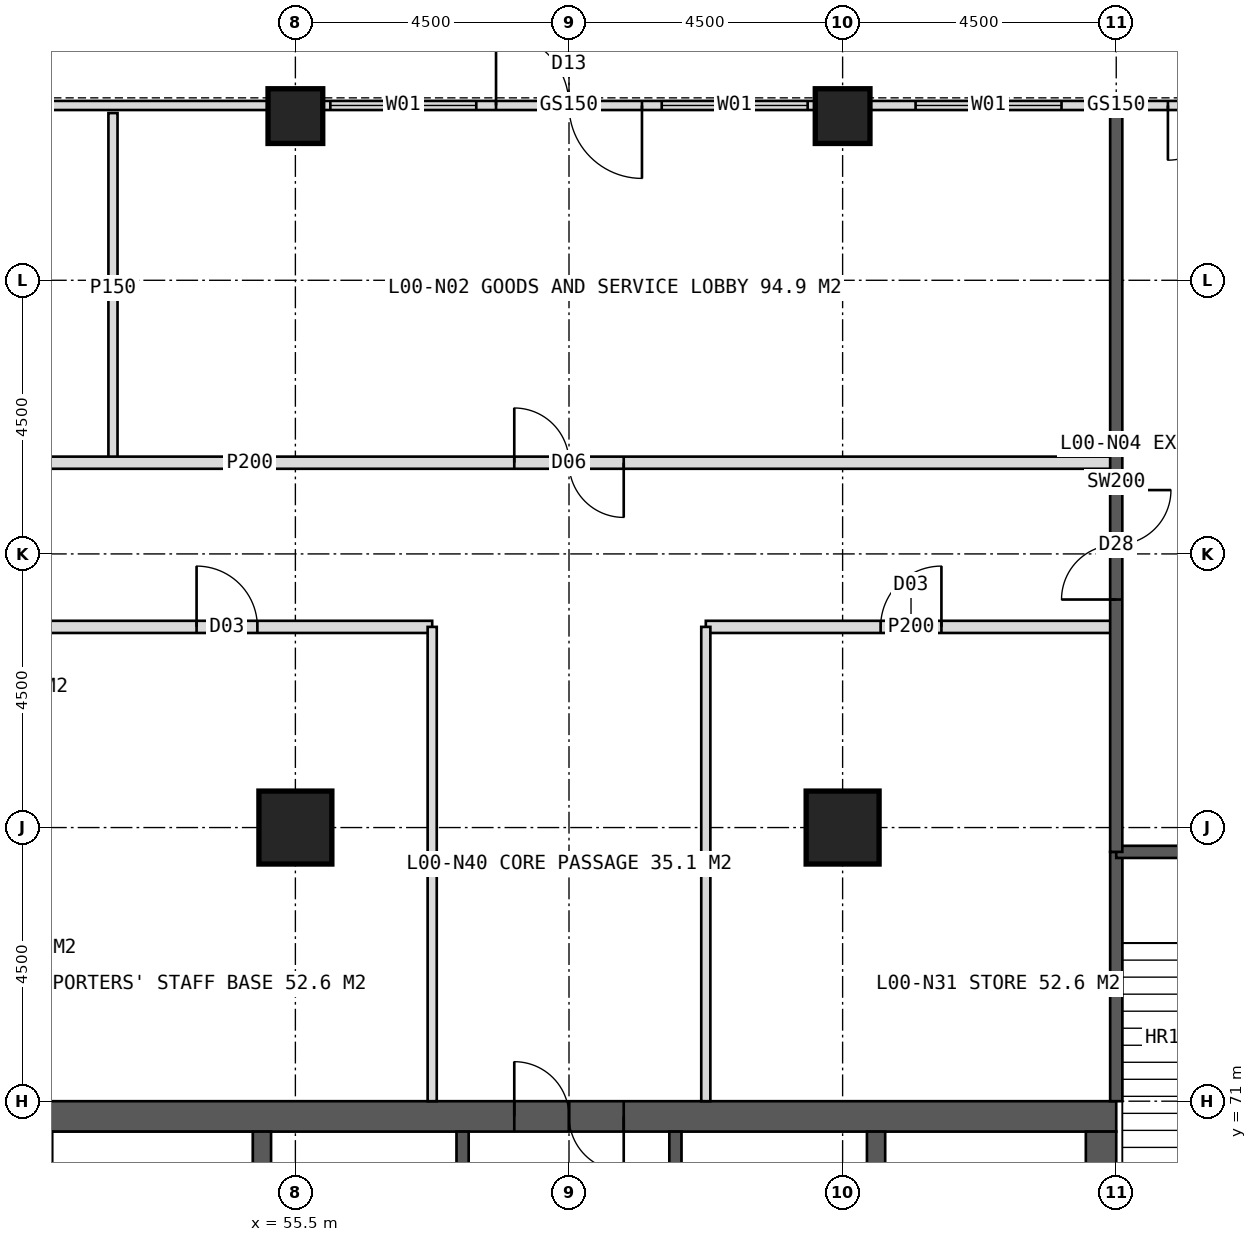
"""IFC4 building model, lengths in metres.
Left out: names, types, materials, properties, quantities, classifications, styles, units other than length and angle.
Written with IfcOpenShell. Run it as: python <this file> out.ifc"""

import sys

from ifc_helpers import new_model, si_unit, direction, frame, frame_2d, origin, origin_2d, place, context, subcontext, project, spatial, rectangle, hollow_rectangle, extrude, element, fill, save


model = new_model("IFC4")
c1 = context("Model", 3, precision=1e-05, world=origin(), true_north=direction((0.0, 1.0)))
c2 = subcontext(c1, "Body", "Model", "MODEL_VIEW")
j1 = project(units=[si_unit("LENGTHUNIT", "METRE"), si_unit("PLANEANGLEUNIT", "RADIAN")], contexts=[c1])
p1 = place(None, origin())
s1 = spatial("IfcSite", under=j1, at=p1, CompositionType="ELEMENT")
p2 = place(p1, origin())
s2 = spatial("IfcBuilding", under=s1, at=p2, CompositionType="ELEMENT")
p3 = place(p2, origin())
s3 = spatial("IfcBuildingStorey", under=s2, at=p3, CompositionType="ELEMENT", Elevation=0.0)
p4 = place(p3, frame((51.0, 70.75, 0.0), z_axis=(0.0, 0.0, 1.0), x_axis=(1.0, 0.0, 0.0)))
e1 = element("IfcWall", 1, at=p4, inside=s3, PredefinedType="SHEAR", context=c2, shape_type="SweptSolid", body=[
    extrude(rectangle(XDim=18.0, YDim=0.5, at=frame_2d((9.0, 0.0))), origin(), (0.0, 0.0, 1.0), 6.0),
])
p5 = place(p4, frame((8.1, 0.0, 0.0)))
e2 = element("IfcOpeningElement", 2, at=p5, cuts=e1, PredefinedType="OPENING", context=c2, shape_type="SweptSolid", body=[
    extrude(rectangle(XDim=1.8, YDim=2.2, at=frame_2d((0.9, 1.1))), frame((0.0, 0.26, 0.0), z_axis=(0.0, -1.0, 0.0), x_axis=(1.0, 0.0, 0.0)), (0.0, 0.0, 1.0), 0.52),
])
p6 = place(p3, frame((68.75, 53.5, 0.0), z_axis=(0.0, 0.0, 1.0), x_axis=(0.0, 1.0, 0.0)))
e3 = element("IfcWall", 3, at=p6, inside=s3, PredefinedType="SHEAR", context=c2, shape_type="SweptSolid", body=[
    extrude(rectangle(XDim=17.0, YDim=0.5, at=frame_2d((8.5, 0.0))), origin(), (0.0, 0.0, 1.0), 6.0),
])
p7 = place(p6, frame((9.5, 0.0, 0.0)))
e4 = element("IfcOpeningElement", 4, at=p7, cuts=e3, PredefinedType="OPENING", context=c2, shape_type="SweptSolid", body=[
    extrude(rectangle(XDim=1.5, YDim=2.2, at=frame_2d((0.75, 1.1))), frame((0.0, 0.26, 0.0), z_axis=(0.0, -1.0, 0.0), x_axis=(1.0, 0.0, 0.0)), (0.0, 0.0, 1.0), 0.52),
])
for number, where, z_axis, x_axis in (
    (5, (54.95, 53.5, 0.0), (0.0, 0.0, 1.0), (0.0, 1.0, 0.0)),
    (6, (65.05, 53.5, 0.0), (0.0, 0.0, 1.0), (0.0, 1.0, 0.0)),
):
    element("IfcWall", number, at=place(p3, frame(where, z_axis=z_axis, x_axis=x_axis)), inside=s3, PredefinedType="SHEAR", context=c2, shape_type="SweptSolid", body=[
        extrude(rectangle(XDim=17.0, YDim=0.3, at=frame_2d((8.5, 0.0))), origin(), (0.0, 0.0, 1.0), 6.0),
    ])
p8 = place(p3, frame((58.25, 53.5, 0.0), z_axis=(0.0, 0.0, 1.0), x_axis=(0.0, 1.0, 0.0)))
e7 = element("IfcWall", 7, at=p8, inside=s3, PredefinedType="SHEAR", context=c2, shape_type="SweptSolid", body=[
    extrude(rectangle(XDim=17.0, YDim=0.2, at=frame_2d((8.5, 0.0))), origin(), (0.0, 0.0, 1.0), 6.0),
])
p9 = place(p8, frame((1.375, 0.0, 0.0)))
e8 = element("IfcOpeningElement", 8, at=p9, cuts=e7, PredefinedType="OPENING", context=c2, shape_type="SweptSolid", body=[
    extrude(rectangle(XDim=1.4, YDim=2.2, at=frame_2d((0.7, 1.1))), frame((0.0, 0.11, 0.0), z_axis=(0.0, -1.0, 0.0), x_axis=(1.0, 0.0, 0.0)), (0.0, 0.0, 1.0), 0.22),
])
p10 = place(p8, frame((5.675, 0.0, 0.0)))
e9 = element("IfcOpeningElement", 9, at=p10, cuts=e7, PredefinedType="OPENING", context=c2, shape_type="SweptSolid", body=[
    extrude(rectangle(XDim=1.4, YDim=2.2, at=frame_2d((0.7, 1.1))), frame((0.0, 0.11, 0.0), z_axis=(0.0, -1.0, 0.0), x_axis=(1.0, 0.0, 0.0)), (0.0, 0.0, 1.0), 0.22),
])
p11 = place(p8, frame((9.925, 0.0, 0.0)))
e10 = element("IfcOpeningElement", 10, at=p11, cuts=e7, PredefinedType="OPENING", context=c2, shape_type="SweptSolid", body=[
    extrude(rectangle(XDim=1.4, YDim=2.2, at=frame_2d((0.7, 1.1))), frame((0.0, 0.11, 0.0), z_axis=(0.0, -1.0, 0.0), x_axis=(1.0, 0.0, 0.0)), (0.0, 0.0, 1.0), 0.22),
])
p12 = place(p8, frame((14.225, 0.0, 0.0)))
e11 = element("IfcOpeningElement", 11, at=p12, cuts=e7, PredefinedType="OPENING", context=c2, shape_type="SweptSolid", body=[
    extrude(rectangle(XDim=1.4, YDim=2.2, at=frame_2d((0.7, 1.1))), frame((0.0, 0.11, 0.0), z_axis=(0.0, -1.0, 0.0), x_axis=(1.0, 0.0, 0.0)), (0.0, 0.0, 1.0), 0.22),
])
p13 = place(p3, frame((61.75, 53.5, 0.0), z_axis=(0.0, 0.0, 1.0), x_axis=(0.0, 1.0, 0.0)))
e12 = element("IfcWall", 12, at=p13, inside=s3, PredefinedType="SHEAR", context=c2, shape_type="SweptSolid", body=[
    extrude(rectangle(XDim=17.0, YDim=0.2, at=frame_2d((8.5, 0.0))), origin(), (0.0, 0.0, 1.0), 6.0),
])
p14 = place(p13, frame((1.375, 0.0, 0.0)))
e13 = element("IfcOpeningElement", 13, at=p14, cuts=e12, PredefinedType="OPENING", context=c2, shape_type="SweptSolid", body=[
    extrude(rectangle(XDim=1.4, YDim=2.2, at=frame_2d((0.7, 1.1))), frame((0.0, 0.11, 0.0), z_axis=(0.0, -1.0, 0.0), x_axis=(1.0, 0.0, 0.0)), (0.0, 0.0, 1.0), 0.22),
])
p15 = place(p13, frame((5.675, 0.0, 0.0)))
e14 = element("IfcOpeningElement", 14, at=p15, cuts=e12, PredefinedType="OPENING", context=c2, shape_type="SweptSolid", body=[
    extrude(rectangle(XDim=1.4, YDim=2.2, at=frame_2d((0.7, 1.1))), frame((0.0, 0.11, 0.0), z_axis=(0.0, -1.0, 0.0), x_axis=(1.0, 0.0, 0.0)), (0.0, 0.0, 1.0), 0.22),
])
p16 = place(p13, frame((9.925, 0.0, 0.0)))
e15 = element("IfcOpeningElement", 15, at=p16, cuts=e12, PredefinedType="OPENING", context=c2, shape_type="SweptSolid", body=[
    extrude(rectangle(XDim=1.4, YDim=2.2, at=frame_2d((0.7, 1.1))), frame((0.0, 0.11, 0.0), z_axis=(0.0, -1.0, 0.0), x_axis=(1.0, 0.0, 0.0)), (0.0, 0.0, 1.0), 0.22),
])
p17 = place(p13, frame((14.225, 0.0, 0.0)))
e16 = element("IfcOpeningElement", 16, at=p17, cuts=e12, PredefinedType="OPENING", context=c2, shape_type="SweptSolid", body=[
    extrude(rectangle(XDim=1.4, YDim=2.2, at=frame_2d((0.7, 1.1))), frame((0.0, 0.11, 0.0), z_axis=(0.0, -1.0, 0.0), x_axis=(1.0, 0.0, 0.0)), (0.0, 0.0, 1.0), 0.22),
])
for number, where, z_axis, x_axis in (
    (17, (55.5, 75.5, 0.0), (0.0, 0.0, 1.0), (1.0, 0.0, 0.0)),
    (18, (64.5, 75.5, 0.0), (0.0, 0.0, 1.0), (1.0, 0.0, 0.0)),
):
    element("IfcColumn", number, at=place(p3, frame(where, z_axis=z_axis, x_axis=x_axis)), inside=s3, PredefinedType="COLUMN", context=c2, shape_type="SweptSolid", body=[
        extrude(hollow_rectangle(XDim=1.2, YDim=1.2, WallThickness=0.1, at=origin_2d()), origin(), (0.0, 0.0, 1.0), 6.0),
    ])
for number, where, z_axis, x_axis in (
    (19, (55.5, 87.2, 0.0), (0.0, 0.0, 1.0), (1.0, 0.0, 0.0)),
    (20, (64.5, 87.2, 0.0), (0.0, 0.0, 1.0), (1.0, 0.0, 0.0)),
):
    element("IfcColumn", number, at=place(p3, frame(where, z_axis=z_axis, x_axis=x_axis)), inside=s3, PredefinedType="COLUMN", context=c2, shape_type="SweptSolid", body=[
        extrude(hollow_rectangle(XDim=0.9, YDim=0.9, WallThickness=0.08, at=origin_2d()), origin(), (0.0, 0.0, 1.0), 6.0),
    ])
p18 = place(p3, frame((73.05, 87.375, 0.0), z_axis=(0.0, 0.0, 1.0), x_axis=(-1.0, 0.0, 0.0)))
e21 = element("IfcWall", 21, at=p18, inside=s3, PredefinedType="STANDARD", context=c2, shape_type="SweptSolid", body=[
    extrude(rectangle(XDim=8.1, YDim=0.15, at=frame_2d((4.05, 0.0))), origin(), (0.0, 0.0, 1.0), 5.1),
])
p19 = place(p18, frame((1.4, 0.0, 0.0)))
e22 = element("IfcOpeningElement", 22, at=p19, cuts=e21, PredefinedType="OPENING", context=c2, shape_type="SweptSolid", body=[
    extrude(rectangle(XDim=1.8, YDim=2.4, at=frame_2d((0.9, 1.2))), frame((0.0, 0.085, 0.0), z_axis=(0.0, -1.0, 0.0), x_axis=(1.0, 0.0, 0.0)), (0.0, 0.0, 1.0), 0.17),
])
p20 = place(p18, frame((4.95, 0.0, 0.6)))
e23 = element("IfcOpeningElement", 23, at=p20, cuts=e21, PredefinedType="OPENING", context=c2, shape_type="SweptSolid", body=[
    extrude(rectangle(XDim=2.4, YDim=3.0, at=frame_2d((1.2, 1.5))), frame((0.0, 0.085, 0.0), z_axis=(0.0, -1.0, 0.0), x_axis=(1.0, 0.0, 0.0)), (0.0, 0.0, 1.0), 0.17),
])
p21 = place(p3, frame((64.05, 87.375, 0.0), z_axis=(0.0, 0.0, 1.0), x_axis=(-1.0, 0.0, 0.0)))
e24 = element("IfcWall", 24, at=p21, inside=s3, PredefinedType="STANDARD", context=c2, shape_type="SweptSolid", body=[
    extrude(rectangle(XDim=8.1, YDim=0.15, at=frame_2d((4.05, 0.0))), origin(), (0.0, 0.0, 1.0), 5.1),
])
p22 = place(p21, frame((2.85, 0.0, 0.0)))
e25 = element("IfcOpeningElement", 25, at=p22, cuts=e24, PredefinedType="OPENING", context=c2, shape_type="SweptSolid", body=[
    extrude(rectangle(XDim=2.4, YDim=2.7, at=frame_2d((1.2, 1.35))), frame((0.0, 0.085, 0.0), z_axis=(0.0, -1.0, 0.0), x_axis=(1.0, 0.0, 0.0)), (0.0, 0.0, 1.0), 0.17),
])
p23 = place(p21, frame((0.125, 0.0, 0.6)))
e26 = element("IfcOpeningElement", 26, at=p23, cuts=e24, PredefinedType="OPENING", context=c2, shape_type="SweptSolid", body=[
    extrude(rectangle(XDim=2.4, YDim=3.0, at=frame_2d((1.2, 1.5))), frame((0.0, 0.085, 0.0), z_axis=(0.0, -1.0, 0.0), x_axis=(1.0, 0.0, 0.0)), (0.0, 0.0, 1.0), 0.17),
])
p24 = place(p21, frame((5.575, 0.0, 0.6)))
e27 = element("IfcOpeningElement", 27, at=p24, cuts=e24, PredefinedType="OPENING", context=c2, shape_type="SweptSolid", body=[
    extrude(rectangle(XDim=2.4, YDim=3.0, at=frame_2d((1.2, 1.5))), frame((0.0, 0.085, 0.0), z_axis=(0.0, -1.0, 0.0), x_axis=(1.0, 0.0, 0.0)), (0.0, 0.0, 1.0), 0.17),
])
p25 = place(p3, frame((55.05, 87.375, 0.0), z_axis=(0.0, 0.0, 1.0), x_axis=(-1.0, 0.0, 0.0)))
e28 = element("IfcWall", 28, at=p25, inside=s3, PredefinedType="STANDARD", context=c2, shape_type="SweptSolid", body=[
    extrude(rectangle(XDim=8.1, YDim=0.15, at=frame_2d((4.05, 0.0))), origin(), (0.0, 0.0, 1.0), 5.1),
])
p26 = place(p25, frame((4.188, 0.0, 0.6)))
e29 = element("IfcOpeningElement", 29, at=p26, cuts=e28, PredefinedType="OPENING", context=c2, shape_type="SweptSolid", body=[
    extrude(rectangle(XDim=2.4, YDim=3.0, at=frame_2d((1.2, 1.5))), frame((0.0, 0.085, 0.0), z_axis=(0.0, -1.0, 0.0), x_axis=(1.0, 0.0, 0.0)), (0.0, 0.0, 1.0), 0.17),
])
p27 = place(p3, frame((52.5, 81.5, 0.0), z_axis=(0.0, 0.0, 1.0), x_axis=(0.0, 1.0, 0.0)))
e30 = element("IfcWall", 30, at=p27, inside=s3, PredefinedType="PARTITIONING", context=c2, shape_type="SweptSolid", body=[
    extrude(rectangle(XDim=5.75, YDim=0.15, at=frame_2d((2.875, 0.0))), origin(), (0.0, 0.0, 1.0), 5.7),
])
p28 = place(p3, frame((40.5, 81.5, 0.0), z_axis=(0.0, 0.0, 1.0), x_axis=(1.0, 0.0, 0.0)))
e31 = element("IfcWall", 31, at=p28, inside=s3, PredefinedType="PARTITIONING", context=c2, shape_type="SweptSolid", body=[
    extrude(rectangle(XDim=28.5, YDim=0.2, at=frame_2d((14.25, 0.0))), origin(), (0.0, 0.0, 1.0), 5.7),
])
p29 = place(p28, frame((5.5, 0.0, 0.0)))
e32 = element("IfcOpeningElement", 32, at=p29, cuts=e31, PredefinedType="OPENING", context=c2, shape_type="SweptSolid", body=[
    extrude(rectangle(XDim=1.0, YDim=2.1, at=frame_2d((0.5, 1.05))), frame((0.0, 0.11, 0.0), z_axis=(0.0, -1.0, 0.0), x_axis=(1.0, 0.0, 0.0)), (0.0, 0.0, 1.0), 0.22),
])
p30 = place(p28, frame((18.6, 0.0, 0.0)))
e33 = element("IfcOpeningElement", 33, at=p30, cuts=e31, PredefinedType="OPENING", context=c2, shape_type="SweptSolid", body=[
    extrude(rectangle(XDim=1.8, YDim=2.2, at=frame_2d((0.9, 1.1))), frame((0.0, 0.11, 0.0), z_axis=(0.0, -1.0, 0.0), x_axis=(1.0, 0.0, 0.0)), (0.0, 0.0, 1.0), 0.22),
])
p31 = place(p3, frame((43.2, 78.8, 0.0), z_axis=(0.0, 0.0, 1.0), x_axis=(1.0, 0.0, 0.0)))
e34 = element("IfcWall", 34, at=p31, inside=s3, PredefinedType="PARTITIONING", context=c2, shape_type="SweptSolid", body=[
    extrude(rectangle(XDim=14.55, YDim=0.2, at=frame_2d((7.275, 0.0))), origin(), (0.0, 0.0, 1.0), 5.7),
])
p32 = place(p31, frame((10.675, 0.0, 0.0)))
e35 = element("IfcOpeningElement", 35, at=p32, cuts=e34, PredefinedType="OPENING", context=c2, shape_type="SweptSolid", body=[
    extrude(rectangle(XDim=1.0, YDim=2.1, at=frame_2d((0.5, 1.05))), frame((0.0, 0.11, 0.0), z_axis=(0.0, -1.0, 0.0), x_axis=(1.0, 0.0, 0.0)), (0.0, 0.0, 1.0), 0.22),
])
p33 = place(p3, frame((62.25, 78.8, 0.0), z_axis=(0.0, 0.0, 1.0), x_axis=(1.0, 0.0, 0.0)))
e36 = element("IfcWall", 36, at=p33, inside=s3, PredefinedType="PARTITIONING", context=c2, shape_type="SweptSolid", body=[
    extrude(rectangle(XDim=6.75, YDim=0.2, at=frame_2d((3.375, 0.0))), origin(), (0.0, 0.0, 1.0), 5.7),
])
p34 = place(p33, frame((2.875, 0.0, 0.0)))
e37 = element("IfcOpeningElement", 37, at=p34, cuts=e36, PredefinedType="OPENING", context=c2, shape_type="SweptSolid", body=[
    extrude(rectangle(XDim=1.0, YDim=2.1, at=frame_2d((0.5, 1.05))), frame((0.0, 0.11, 0.0), z_axis=(0.0, -1.0, 0.0), x_axis=(1.0, 0.0, 0.0)), (0.0, 0.0, 1.0), 0.22),
])
for number, where, z_axis, x_axis in (
    (38, (57.75, 71.0, 0.0), (0.0, 0.0, 1.0), (0.0, 1.0, 0.0)),
    (39, (62.25, 71.0, 0.0), (0.0, 0.0, 1.0), (0.0, 1.0, 0.0)),
):
    element("IfcWall", number, at=place(p3, frame(where, z_axis=z_axis, x_axis=x_axis)), inside=s3, PredefinedType="PARTITIONING", context=c2, shape_type="SweptSolid", body=[
        extrude(rectangle(XDim=7.8, YDim=0.15, at=frame_2d((3.9, 0.0))), origin(), (0.0, 0.0, 1.0), 5.7),
    ])
p35 = place(p3, frame((69.0, 71.0, 0.0), z_axis=(0.0, 0.0, 1.0), x_axis=(0.0, 1.0, 0.0)))
e40 = element("IfcWall", 40, at=p35, inside=s3, PredefinedType="SOLIDWALL", context=c2, shape_type="SweptSolid", body=[
    extrude(rectangle(XDim=4.1, YDim=0.2, at=frame_2d((2.05, 0.0))), origin(), (0.0, 0.0, 1.0), 5.7),
])
p36 = place(p3, frame((69.0, 75.1, 0.0), z_axis=(0.0, 0.0, 1.0), x_axis=(1.0, 0.0, 0.0)))
e41 = element("IfcWall", 41, at=p36, inside=s3, PredefinedType="SOLIDWALL", context=c2, shape_type="SweptSolid", body=[
    extrude(rectangle(XDim=3.5, YDim=0.2, at=frame_2d((1.75, 0.0))), origin(), (0.0, 0.0, 1.0), 5.7),
])
p37 = place(p36, frame((1.15, 0.0, 0.0)))
e42 = element("IfcOpeningElement", 42, at=p37, cuts=e41, PredefinedType="OPENING", context=c2, shape_type="SweptSolid", body=[
    extrude(rectangle(XDim=1.2, YDim=2.1, at=frame_2d((0.6, 1.05))), frame((0.0, 0.11, 0.0), z_axis=(0.0, -1.0, 0.0), x_axis=(1.0, 0.0, 0.0)), (0.0, 0.0, 1.0), 0.22),
])
p38 = place(p3, frame((69.0, 75.1, 0.0), z_axis=(0.0, 0.0, 1.0), x_axis=(0.0, 1.0, 0.0)))
e43 = element("IfcWall", 43, at=p38, inside=s3, PredefinedType="SOLIDWALL", context=c2, shape_type="SweptSolid", body=[
    extrude(rectangle(XDim=12.15, YDim=0.2, at=frame_2d((6.075, 0.0))), origin(), (0.0, 0.0, 1.0), 5.7),
])
p39 = place(p38, frame((4.15, 0.0, 0.0)))
e44 = element("IfcOpeningElement", 44, at=p39, cuts=e43, PredefinedType="OPENING", context=c2, shape_type="SweptSolid", body=[
    extrude(rectangle(XDim=1.8, YDim=2.2, at=frame_2d((0.9, 1.1))), frame((0.0, 0.11, 0.0), z_axis=(0.0, -1.0, 0.0), x_axis=(1.0, 0.0, 0.0)), (0.0, 0.0, 1.0), 0.22),
])
p40 = place(p22, origin())
e45 = element("IfcDoor", 45, at=p40, inside=s3, OperationType="DOUBLE_DOOR_SINGLE_SWING", PredefinedType="DOOR", context=c2, shape_type="SweptSolid", body=[
    extrude(rectangle(XDim=2.4, YDim=2.7, at=frame_2d((1.2, 1.35))), frame((0.0, 0.025, 0.0), z_axis=(0.0, -1.0, 0.0), x_axis=(1.0, 0.0, 0.0)), (0.0, 0.0, 1.0), 0.05),
])
fill(e25, e45)
p41 = place(p19, frame((1.8, 0.0, 0.0), z_axis=(0.0, 0.0, 1.0), x_axis=(-1.0, 0.0, 0.0)))
e46 = element("IfcDoor", 46, at=p41, inside=s3, OperationType="DOUBLE_DOOR_SINGLE_SWING", PredefinedType="DOOR", context=c2, shape_type="SweptSolid", body=[
    extrude(rectangle(XDim=1.8, YDim=2.4, at=frame_2d((0.9, 1.2))), frame((0.0, 0.025, 0.0), z_axis=(0.0, -1.0, 0.0), x_axis=(1.0, 0.0, 0.0)), (0.0, 0.0, 1.0), 0.05),
])
fill(e22, e46)
p42 = place(p20, origin())
e47 = element("IfcWindow", 47, at=p42, inside=s3, PartitioningType="SINGLE_PANEL", PredefinedType="WINDOW", context=c2, shape_type="SweptSolid", body=[
    extrude(rectangle(XDim=2.4, YDim=3.0, at=frame_2d((1.2, 1.5))), frame((0.0, 0.03, 0.0), z_axis=(0.0, -1.0, 0.0), x_axis=(1.0, 0.0, 0.0)), (0.0, 0.0, 1.0), 0.06),
])
fill(e23, e47)
p43 = place(p23, origin())
e48 = element("IfcWindow", 48, at=p43, inside=s3, PartitioningType="SINGLE_PANEL", PredefinedType="WINDOW", context=c2, shape_type="SweptSolid", body=[
    extrude(rectangle(XDim=2.4, YDim=3.0, at=frame_2d((1.2, 1.5))), frame((0.0, 0.03, 0.0), z_axis=(0.0, -1.0, 0.0), x_axis=(1.0, 0.0, 0.0)), (0.0, 0.0, 1.0), 0.06),
])
fill(e26, e48)
p44 = place(p24, origin())
e49 = element("IfcWindow", 49, at=p44, inside=s3, PartitioningType="SINGLE_PANEL", PredefinedType="WINDOW", context=c2, shape_type="SweptSolid", body=[
    extrude(rectangle(XDim=2.4, YDim=3.0, at=frame_2d((1.2, 1.5))), frame((0.0, 0.03, 0.0), z_axis=(0.0, -1.0, 0.0), x_axis=(1.0, 0.0, 0.0)), (0.0, 0.0, 1.0), 0.06),
])
fill(e27, e49)
p45 = place(p32, origin())
e50 = element("IfcDoor", 50, at=p45, inside=s3, OperationType="SINGLE_SWING_LEFT", PredefinedType="DOOR", context=c2, shape_type="SweptSolid", body=[
    extrude(rectangle(XDim=1.0, YDim=2.1, at=frame_2d((0.5, 1.05))), frame((0.0, 0.025, 0.0), z_axis=(0.0, -1.0, 0.0), x_axis=(1.0, 0.0, 0.0)), (0.0, 0.0, 1.0), 0.05),
])
fill(e35, e50)
p46 = place(p34, origin())
e51 = element("IfcDoor", 51, at=p46, inside=s3, OperationType="SINGLE_SWING_RIGHT", PredefinedType="DOOR", context=c2, shape_type="SweptSolid", body=[
    extrude(rectangle(XDim=1.0, YDim=2.1, at=frame_2d((0.5, 1.05))), frame((0.0, 0.025, 0.0), z_axis=(0.0, -1.0, 0.0), x_axis=(1.0, 0.0, 0.0)), (0.0, 0.0, 1.0), 0.05),
])
fill(e37, e51)
p47 = place(p5, origin())
e52 = element("IfcDoor", 52, at=p47, inside=s3, OperationType="DOUBLE_DOOR_SINGLE_SWING", PredefinedType="DOOR", context=c2, shape_type="SweptSolid", body=[
    extrude(rectangle(XDim=1.8, YDim=2.2, at=frame_2d((0.9, 1.1))), frame((0.0, 0.025, 0.0), z_axis=(0.0, -1.0, 0.0), x_axis=(1.0, 0.0, 0.0)), (0.0, 0.0, 1.0), 0.05),
])
fill(e2, e52)
p48 = place(p30, origin())
e53 = element("IfcDoor", 53, at=p48, inside=s3, OperationType="DOUBLE_DOOR_SINGLE_SWING", PredefinedType="DOOR", context=c2, shape_type="SweptSolid", body=[
    extrude(rectangle(XDim=1.8, YDim=2.2, at=frame_2d((0.9, 1.1))), frame((0.0, 0.025, 0.0), z_axis=(0.0, -1.0, 0.0), x_axis=(1.0, 0.0, 0.0)), (0.0, 0.0, 1.0), 0.05),
])
fill(e33, e53)
p49 = place(p39, origin())
e54 = element("IfcDoor", 54, at=p49, inside=s3, OperationType="DOUBLE_DOOR_SINGLE_SWING", PredefinedType="DOOR", context=c2, shape_type="SweptSolid", body=[
    extrude(rectangle(XDim=1.8, YDim=2.2, at=frame_2d((0.9, 1.1))), frame((0.0, 0.025, 0.0), z_axis=(0.0, -1.0, 0.0), x_axis=(1.0, 0.0, 0.0)), (0.0, 0.0, 1.0), 0.05),
])
fill(e44, e54)
save(model, sys.argv[1])
